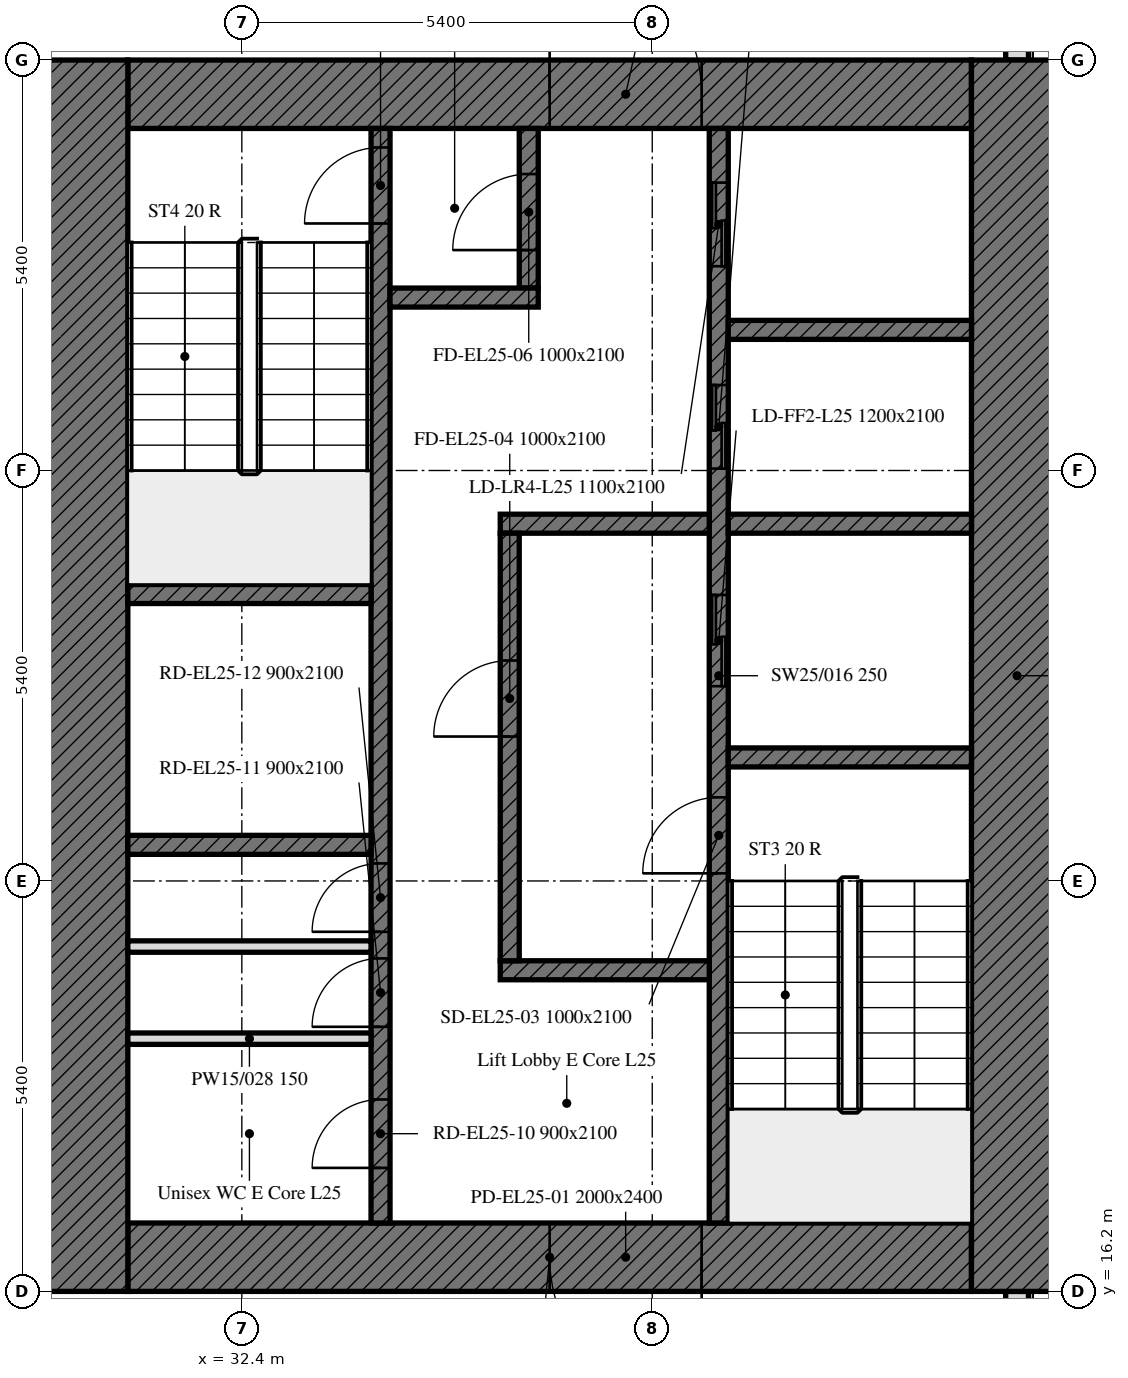
"""IFC4 building model, lengths in metres.
Left out: names, types, materials, properties, quantities, classifications, styles, units other than length and angle.
Written with IfcOpenShell. Run it as: python <this file> out.ifc"""

import sys

from ifc_helpers import new_model, si_unit, direction, frame, frame_2d, origin, place, context, subcontext, project, spatial, rectangle, extrude, element, fill, save


model = new_model("IFC4")
c1 = context("Model", 3, precision=1e-05, world=origin(), true_north=direction((0.0, 1.0)))
c2 = subcontext(c1, "Body", "Model", "MODEL_VIEW")
j1 = project(units=[si_unit("LENGTHUNIT", "METRE"), si_unit("PLANEANGLEUNIT", "RADIAN")], contexts=[c1])
p1 = place(None, origin())
s1 = spatial("IfcSite", under=j1, at=p1, CompositionType="ELEMENT")
p2 = place(p1, origin())
s2 = spatial("IfcBuilding", under=s1, at=p2, CompositionType="ELEMENT")
p3 = place(p2, frame((0.0, 0.0, 106.8)))
s3 = spatial("IfcBuildingStorey", under=s2, at=p3, CompositionType="ELEMENT", Elevation=106.8)
p4 = place(p3, frame((42.6, 10.986, 0.0), z_axis=(0.0, 0.0, 1.0), x_axis=(0.0, 1.0, 0.0)))
e1 = element("IfcWall", 1, at=p4, inside=s3, PredefinedType="SOLIDWALL", context=c2, shape_type="SweptSolid", body=[
    extrude(rectangle(XDim=5.214, YDim=0.3, at=frame_2d((2.607, 0.0))), origin(), (0.0, 0.0, 1.0), 3.5),
])
p5 = place(p3, frame((42.6, 32.4, 0.0), z_axis=(0.0, 0.0, 1.0), x_axis=(0.0, 1.0, 0.0)))
e2 = element("IfcWall", 2, at=p5, inside=s3, PredefinedType="SOLIDWALL", context=c2, shape_type="SweptSolid", body=[
    extrude(rectangle(XDim=10.614, YDim=0.3, at=frame_2d((5.307, 0.0))), origin(), (0.0, 0.0, 1.0), 3.5),
])
p6 = place(p5, frame((6.4, 0.0, 0.9)))
e3 = element("IfcOpeningElement", 3, at=p6, cuts=e2, PredefinedType="OPENING", context=c2, shape_type="SweptSolid", body=[
    extrude(rectangle(XDim=3.4, YDim=1.7, at=frame_2d((1.7, 0.85))), frame((0.0, 0.16, 0.0), z_axis=(0.0, -1.0, 0.0), x_axis=(1.0, 0.0, 0.0)), (0.0, 0.0, 1.0), 0.32),
])
p7 = place(p3, frame((42.0, 16.65, 0.0), z_axis=(0.0, 0.0, 1.0), x_axis=(-1.0, 0.0, 0.0)))
e4 = element("IfcWall", 4, at=p7, inside=s3, PredefinedType="SOLIDWALL", context=c2, shape_type="SweptSolid", body=[
    extrude(rectangle(XDim=11.1, YDim=0.9, at=frame_2d((5.55, 0.0))), origin(), (0.0, 0.0, 1.0), 3.5),
])
p8 = place(p7, frame((3.55, 0.0, 0.0)))
e5 = element("IfcOpeningElement", 5, at=p8, cuts=e4, PredefinedType="OPENING", context=c2, shape_type="SweptSolid", body=[
    extrude(rectangle(XDim=2.0, YDim=2.4, at=frame_2d((1.0, 1.2))), frame((0.0, 0.45, 0.0), z_axis=(0.0, -1.0, 0.0), x_axis=(1.0, 0.0, 0.0)), (0.0, 0.0, 1.0), 0.9),
])
p9 = place(p3, frame((30.9, 31.95, 0.0), z_axis=(0.0, 0.0, 1.0), x_axis=(1.0, 0.0, 0.0)))
e6 = element("IfcWall", 6, at=p9, inside=s3, PredefinedType="SOLIDWALL", context=c2, shape_type="SweptSolid", body=[
    extrude(rectangle(XDim=11.1, YDim=0.9, at=frame_2d((5.55, 0.0))), origin(), (0.0, 0.0, 1.0), 3.5),
])
p10 = place(p9, frame((5.55, 0.0, 0.0)))
e7 = element("IfcOpeningElement", 7, at=p10, cuts=e6, PredefinedType="OPENING", context=c2, shape_type="SweptSolid", body=[
    extrude(rectangle(XDim=2.0, YDim=2.4, at=frame_2d((1.0, 1.2))), frame((0.0, 0.45, 0.0), z_axis=(0.0, -1.0, 0.0), x_axis=(1.0, 0.0, 0.0)), (0.0, 0.0, 1.0), 0.9),
])
for number, where, z_axis, x_axis in (
    (8, (42.6, 32.4, 0.0), (0.0, 0.0, 1.0), (0.0, -1.0, 0.0)),
    (9, (30.3, 16.2, 0.0), (0.0, 0.0, 1.0), (0.0, 1.0, 0.0)),
):
    element("IfcWall", number, at=place(p3, frame(where, z_axis=z_axis, x_axis=x_axis)), inside=s3, PredefinedType="SOLIDWALL", context=c2, shape_type="SweptSolid", body=[
        extrude(rectangle(XDim=16.2, YDim=1.2, at=frame_2d((8.1, 0.0))), origin(), (0.0, 0.0, 1.0), 3.5),
    ])
p11 = place(p3, frame((38.675, 17.1, 0.0), z_axis=(0.0, 0.0, 1.0), x_axis=(0.0, 1.0, 0.0)))
e10 = element("IfcWall", 10, at=p11, inside=s3, PredefinedType="SOLIDWALL", context=c2, shape_type="SweptSolid", body=[
    extrude(rectangle(XDim=14.4, YDim=0.25, at=frame_2d((7.2, 0.0))), origin(), (0.0, 0.0, 1.0), 3.5),
])
p12 = place(p11, frame((4.6, 0.0, 0.0)))
e11 = element("IfcOpeningElement", 11, at=p12, cuts=e10, PredefinedType="OPENING", context=c2, shape_type="SweptSolid", body=[
    extrude(rectangle(XDim=1.0, YDim=2.1, at=frame_2d((0.5, 1.05))), frame((0.0, 0.125, 0.0), z_axis=(0.0, -1.0, 0.0), x_axis=(1.0, 0.0, 0.0)), (0.0, 0.0, 1.0), 0.25),
])
p13 = place(p11, frame((7.062, 0.0, 0.0)))
e12 = element("IfcOpeningElement", 12, at=p13, cuts=e10, PredefinedType="OPENING", context=c2, shape_type="SweptSolid", body=[
    extrude(rectangle(XDim=1.2, YDim=2.1, at=frame_2d((0.6, 1.05))), frame((0.0, 0.125, 0.0), z_axis=(0.0, -1.0, 0.0), x_axis=(1.0, 0.0, 0.0)), (0.0, 0.0, 1.0), 0.25),
])
p14 = place(p11, frame((9.925, 0.0, 0.0)))
e13 = element("IfcOpeningElement", 13, at=p14, cuts=e10, PredefinedType="OPENING", context=c2, shape_type="SweptSolid", body=[
    extrude(rectangle(XDim=1.1, YDim=2.1, at=frame_2d((0.55, 1.05))), frame((0.0, 0.125, 0.0), z_axis=(0.0, -1.0, 0.0), x_axis=(1.0, 0.0, 0.0)), (0.0, 0.0, 1.0), 0.25),
])
p15 = place(p11, frame((12.587, 0.0, 0.0)))
e14 = element("IfcOpeningElement", 14, at=p15, cuts=e10, PredefinedType="OPENING", context=c2, shape_type="SweptSolid", body=[
    extrude(rectangle(XDim=1.1, YDim=2.1, at=frame_2d((0.55, 1.05))), frame((0.0, 0.125, 0.0), z_axis=(0.0, -1.0, 0.0), x_axis=(1.0, 0.0, 0.0)), (0.0, 0.0, 1.0), 0.25),
])
p16 = place(p3, frame((34.225, 17.1, 0.0), z_axis=(0.0, 0.0, 1.0), x_axis=(0.0, 1.0, 0.0)))
e15 = element("IfcWall", 15, at=p16, inside=s3, PredefinedType="SOLIDWALL", context=c2, shape_type="SweptSolid", body=[
    extrude(rectangle(XDim=14.4, YDim=0.25, at=frame_2d((7.2, 0.0))), origin(), (0.0, 0.0, 1.0), 3.5),
])
p17 = place(p16, frame((13.15, 0.0, 0.0)))
e16 = element("IfcOpeningElement", 16, at=p17, cuts=e15, PredefinedType="OPENING", context=c2, shape_type="SweptSolid", body=[
    extrude(rectangle(XDim=1.0, YDim=2.1, at=frame_2d((0.5, 1.05))), frame((0.0, 0.125, 0.0), z_axis=(0.0, -1.0, 0.0), x_axis=(1.0, 0.0, 0.0)), (0.0, 0.0, 1.0), 0.25),
])
p18 = place(p16, frame((0.725, 0.0, 0.0)))
e17 = element("IfcOpeningElement", 17, at=p18, cuts=e15, PredefinedType="OPENING", context=c2, shape_type="SweptSolid", body=[
    extrude(rectangle(XDim=0.9, YDim=2.1, at=frame_2d((0.45, 1.05))), frame((0.0, 0.125, 0.0), z_axis=(0.0, -1.0, 0.0), x_axis=(1.0, 0.0, 0.0)), (0.0, 0.0, 1.0), 0.25),
])
p19 = place(p16, frame((2.581, 0.0, 0.0)))
e18 = element("IfcOpeningElement", 18, at=p19, cuts=e15, PredefinedType="OPENING", context=c2, shape_type="SweptSolid", body=[
    extrude(rectangle(XDim=0.9, YDim=2.1, at=frame_2d((0.45, 1.05))), frame((0.0, 0.125, 0.0), z_axis=(0.0, -1.0, 0.0), x_axis=(1.0, 0.0, 0.0)), (0.0, 0.0, 1.0), 0.25),
])
p20 = place(p16, frame((3.831, 0.0, 0.0)))
e19 = element("IfcOpeningElement", 19, at=p20, cuts=e15, PredefinedType="OPENING", context=c2, shape_type="SweptSolid", body=[
    extrude(rectangle(XDim=0.9, YDim=2.1, at=frame_2d((0.45, 1.05))), frame((0.0, 0.125, 0.0), z_axis=(0.0, -1.0, 0.0), x_axis=(1.0, 0.0, 0.0)), (0.0, 0.0, 1.0), 0.25),
])
p21 = place(p3, frame((38.8, 23.225, 0.0), z_axis=(0.0, 0.0, 1.0), x_axis=(1.0, 0.0, 0.0)))
e20 = element("IfcWall", 20, at=p21, inside=s3, PredefinedType="SOLIDWALL", context=c2, shape_type="SweptSolid", body=[
    extrude(rectangle(XDim=3.2, YDim=0.25, at=frame_2d((1.6, 0.0))), origin(), (0.0, 0.0, 1.0), 3.5),
])
for number, where, z_axis, x_axis in (
    (21, (30.9, 25.375, 0.0), (0.0, 0.0, 1.0), (1.0, 0.0, 0.0)),
    (22, (30.9, 22.075, 0.0), (0.0, 0.0, 1.0), (1.0, 0.0, 0.0)),
):
    element("IfcWall", number, at=place(p3, frame(where, z_axis=z_axis, x_axis=x_axis)), inside=s3, PredefinedType="SOLIDWALL", context=c2, shape_type="SweptSolid", body=[
        extrude(rectangle(XDim=3.2, YDim=0.25, at=frame_2d((1.6, 0.0))), origin(), (0.0, 0.0, 1.0), 3.5),
    ])
p22 = place(p3, frame((38.8, 26.3, 0.0), z_axis=(0.0, 0.0, 1.0), x_axis=(1.0, 0.0, 0.0)))
e23 = element("IfcWall", 23, at=p22, inside=s3, PredefinedType="SOLIDWALL", context=c2, shape_type="SweptSolid", body=[
    extrude(rectangle(XDim=3.2, YDim=0.25, at=frame_2d((1.6, 0.0))), origin(), (0.0, 0.0, 1.0), 3.5),
])
for number, where, z_axis, x_axis in (
    (24, (35.8, 26.3, 0.0), (0.0, 0.0, 1.0), (1.0, 0.0, 0.0)),
    (25, (35.8, 20.425, 0.0), (0.0, 0.0, 1.0), (1.0, 0.0, 0.0)),
):
    element("IfcWall", number, at=place(p3, frame(where, z_axis=z_axis, x_axis=x_axis)), inside=s3, PredefinedType="SOLIDWALL", context=c2, shape_type="SweptSolid", body=[
        extrude(rectangle(XDim=2.75, YDim=0.25, at=frame_2d((1.375, 0.0))), origin(), (0.0, 0.0, 1.0), 3.5),
    ])
p23 = place(p3, frame((36.175, 29.4, 0.0), z_axis=(0.0, 0.0, 1.0), x_axis=(0.0, 1.0, 0.0)))
e26 = element("IfcWall", 26, at=p23, inside=s3, PredefinedType="SOLIDWALL", context=c2, shape_type="SweptSolid", body=[
    extrude(rectangle(XDim=2.1, YDim=0.25, at=frame_2d((1.05, 0.0))), origin(), (0.0, 0.0, 1.0), 3.5),
])
p24 = place(p23, frame((0.5, 0.0, 0.0)))
e27 = element("IfcOpeningElement", 27, at=p24, cuts=e26, PredefinedType="OPENING", context=c2, shape_type="SweptSolid", body=[
    extrude(rectangle(XDim=1.0, YDim=2.1, at=frame_2d((0.5, 1.05))), frame((0.0, 0.125, 0.0), z_axis=(0.0, -1.0, 0.0), x_axis=(1.0, 0.0, 0.0)), (0.0, 0.0, 1.0), 0.25),
])
p25 = place(p3, frame((34.35, 29.275, 0.0), z_axis=(0.0, 0.0, 1.0), x_axis=(1.0, 0.0, 0.0)))
e28 = element("IfcWall", 28, at=p25, inside=s3, PredefinedType="SOLIDWALL", context=c2, shape_type="SweptSolid", body=[
    extrude(rectangle(XDim=1.95, YDim=0.25, at=frame_2d((0.975, 0.0))), origin(), (0.0, 0.0, 1.0), 3.5),
])
p26 = place(p3, frame((35.925, 20.55, 0.0), z_axis=(0.0, 0.0, 1.0), x_axis=(0.0, 1.0, 0.0)))
e29 = element("IfcWall", 29, at=p26, inside=s3, PredefinedType="SOLIDWALL", context=c2, shape_type="SweptSolid", body=[
    extrude(rectangle(XDim=5.625, YDim=0.25, at=frame_2d((2.812, 0.0))), origin(), (0.0, 0.0, 1.0), 3.5),
])
p27 = place(p26, frame((2.95, 0.0, 0.0)))
e30 = element("IfcOpeningElement", 30, at=p27, cuts=e29, PredefinedType="OPENING", context=c2, shape_type="SweptSolid", body=[
    extrude(rectangle(XDim=1.0, YDim=2.1, at=frame_2d((0.5, 1.05))), frame((0.0, 0.125, 0.0), z_axis=(0.0, -1.0, 0.0), x_axis=(1.0, 0.0, 0.0)), (0.0, 0.0, 1.0), 0.25),
])
p28 = place(p3, frame((38.8, 28.85, 0.0), z_axis=(0.0, 0.0, 1.0), x_axis=(1.0, 0.0, 0.0)))
e31 = element("IfcWall", 31, at=p28, inside=s3, PredefinedType="SOLIDWALL", context=c2, shape_type="SweptSolid", body=[
    extrude(rectangle(XDim=3.2, YDim=0.25, at=frame_2d((1.6, 0.0))), origin(), (0.0, 0.0, 1.0), 3.5),
])
for number, where, z_axis, x_axis in (
    (32, (30.9, 19.525, 0.0), (0.0, 0.0, 1.0), (1.0, 0.0, 0.0)),
    (33, (30.9, 20.737, 0.0), (0.0, 0.0, 1.0), (1.0, 0.0, 0.0)),
):
    element("IfcWall", number, at=place(p3, frame(where, z_axis=z_axis, x_axis=x_axis)), inside=s3, PredefinedType="PARTITIONING", context=c2, shape_type="SweptSolid", body=[
        extrude(rectangle(XDim=3.2, YDim=0.15, at=frame_2d((1.6, 0.0))), origin(), (0.0, 0.0, 1.0), 3.5),
    ])
p29 = place(p8, origin())
e34 = element("IfcDoor", 34, at=p29, inside=s3, OperationType="DOUBLE_DOOR_SINGLE_SWING", PredefinedType="DOOR", context=c2, shape_type="SweptSolid", body=[
    extrude(rectangle(XDim=2.0, YDim=2.4, at=frame_2d((1.0, 1.2))), frame((0.0, 0.025, 0.0), z_axis=(0.0, -1.0, 0.0), x_axis=(1.0, 0.0, 0.0)), (0.0, 0.0, 1.0), 0.05),
])
fill(e5, e34)
p30 = place(p10, origin())
e35 = element("IfcDoor", 35, at=p30, inside=s3, OperationType="DOUBLE_DOOR_SINGLE_SWING", PredefinedType="DOOR", context=c2, shape_type="SweptSolid", body=[
    extrude(rectangle(XDim=2.0, YDim=2.4, at=frame_2d((1.0, 1.2))), frame((0.0, 0.025, 0.0), z_axis=(0.0, -1.0, 0.0), x_axis=(1.0, 0.0, 0.0)), (0.0, 0.0, 1.0), 0.05),
])
fill(e7, e35)
p31 = place(p12, origin())
e36 = element("IfcDoor", 36, at=p31, inside=s3, OperationType="SINGLE_SWING_LEFT", PredefinedType="DOOR", context=c2, shape_type="SweptSolid", body=[
    extrude(rectangle(XDim=1.0, YDim=2.1, at=frame_2d((0.5, 1.05))), frame((0.0, 0.025, 0.0), z_axis=(0.0, -1.0, 0.0), x_axis=(1.0, 0.0, 0.0)), (0.0, 0.0, 1.0), 0.05),
])
fill(e11, e36)
p32 = place(p27, origin())
e37 = element("IfcDoor", 37, at=p32, inside=s3, OperationType="SINGLE_SWING_LEFT", PredefinedType="DOOR", context=c2, shape_type="SweptSolid", body=[
    extrude(rectangle(XDim=1.0, YDim=2.1, at=frame_2d((0.5, 1.05))), frame((0.0, 0.025, 0.0), z_axis=(0.0, -1.0, 0.0), x_axis=(1.0, 0.0, 0.0)), (0.0, 0.0, 1.0), 0.05),
])
fill(e30, e37)
p33 = place(p17, origin())
e38 = element("IfcDoor", 38, at=p33, inside=s3, OperationType="SINGLE_SWING_LEFT", PredefinedType="DOOR", context=c2, shape_type="SweptSolid", body=[
    extrude(rectangle(XDim=1.0, YDim=2.1, at=frame_2d((0.5, 1.05))), frame((0.0, 0.025, 0.0), z_axis=(0.0, -1.0, 0.0), x_axis=(1.0, 0.0, 0.0)), (0.0, 0.0, 1.0), 0.05),
])
fill(e16, e38)
p34 = place(p24, origin())
e39 = element("IfcDoor", 39, at=p34, inside=s3, OperationType="SINGLE_SWING_LEFT", PredefinedType="DOOR", context=c2, shape_type="SweptSolid", body=[
    extrude(rectangle(XDim=1.0, YDim=2.1, at=frame_2d((0.5, 1.05))), frame((0.0, 0.025, 0.0), z_axis=(0.0, -1.0, 0.0), x_axis=(1.0, 0.0, 0.0)), (0.0, 0.0, 1.0), 0.05),
])
fill(e27, e39)
p35 = place(p13, origin())
e40 = element("IfcDoor", 40, at=p35, inside=s3, OperationType="DOUBLE_DOOR_SLIDING", PredefinedType="DOOR", context=c2, shape_type="SweptSolid", body=[
    extrude(rectangle(XDim=1.2, YDim=2.1, at=frame_2d((0.6, 1.05))), frame((0.0, 0.025, 0.0), z_axis=(0.0, -1.0, 0.0), x_axis=(1.0, 0.0, 0.0)), (0.0, 0.0, 1.0), 0.05),
])
fill(e12, e40)
p36 = place(p14, origin())
e41 = element("IfcDoor", 41, at=p36, inside=s3, OperationType="DOUBLE_DOOR_SLIDING", PredefinedType="DOOR", context=c2, shape_type="SweptSolid", body=[
    extrude(rectangle(XDim=1.1, YDim=2.1, at=frame_2d((0.55, 1.05))), frame((0.0, 0.025, 0.0), z_axis=(0.0, -1.0, 0.0), x_axis=(1.0, 0.0, 0.0)), (0.0, 0.0, 1.0), 0.05),
])
fill(e13, e41)
p37 = place(p15, origin())
e42 = element("IfcDoor", 42, at=p37, inside=s3, OperationType="DOUBLE_DOOR_SLIDING", PredefinedType="DOOR", context=c2, shape_type="SweptSolid", body=[
    extrude(rectangle(XDim=1.1, YDim=2.1, at=frame_2d((0.55, 1.05))), frame((0.0, 0.025, 0.0), z_axis=(0.0, -1.0, 0.0), x_axis=(1.0, 0.0, 0.0)), (0.0, 0.0, 1.0), 0.05),
])
fill(e14, e42)
p38 = place(p18, origin())
e43 = element("IfcDoor", 43, at=p38, inside=s3, OperationType="SINGLE_SWING_LEFT", PredefinedType="DOOR", context=c2, shape_type="SweptSolid", body=[
    extrude(rectangle(XDim=0.9, YDim=2.1, at=frame_2d((0.45, 1.05))), frame((0.0, 0.025, 0.0), z_axis=(0.0, -1.0, 0.0), x_axis=(1.0, 0.0, 0.0)), (0.0, 0.0, 1.0), 0.05),
])
fill(e17, e43)
p39 = place(p19, origin())
e44 = element("IfcDoor", 44, at=p39, inside=s3, OperationType="SINGLE_SWING_LEFT", PredefinedType="DOOR", context=c2, shape_type="SweptSolid", body=[
    extrude(rectangle(XDim=0.9, YDim=2.1, at=frame_2d((0.45, 1.05))), frame((0.0, 0.025, 0.0), z_axis=(0.0, -1.0, 0.0), x_axis=(1.0, 0.0, 0.0)), (0.0, 0.0, 1.0), 0.05),
])
fill(e18, e44)
p40 = place(p20, origin())
e45 = element("IfcDoor", 45, at=p40, inside=s3, OperationType="SINGLE_SWING_LEFT", PredefinedType="DOOR", context=c2, shape_type="SweptSolid", body=[
    extrude(rectangle(XDim=0.9, YDim=2.1, at=frame_2d((0.45, 1.05))), frame((0.0, 0.025, 0.0), z_axis=(0.0, -1.0, 0.0), x_axis=(1.0, 0.0, 0.0)), (0.0, 0.0, 1.0), 0.05),
])
fill(e19, e45)
save(model, sys.argv[1])
